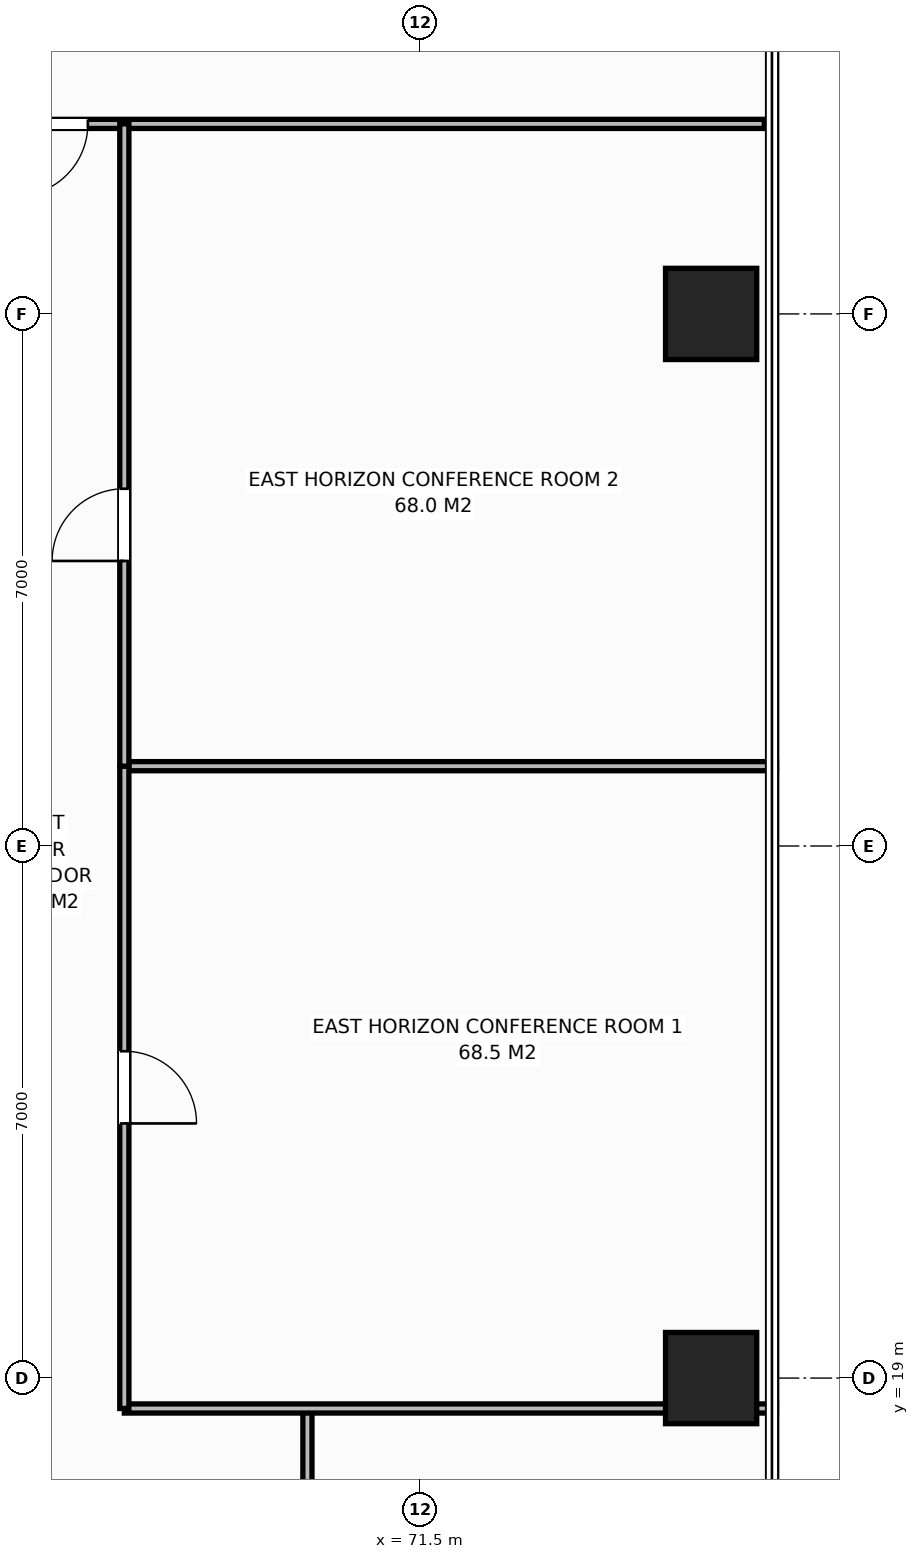
"""IFC4 building model, lengths in metres.
Left out: names, types, materials, properties, quantities, classifications, styles, units other than length and angle.
Written with IfcOpenShell. Run it as: python <this file> out.ifc"""

import sys

from ifc_helpers import new_model, si_unit, direction, frame, frame_2d, origin, origin_2d, place, context, subcontext, project, spatial, rectangle, extrude, element, fill, save


model = new_model("IFC4")
c1 = context("Model", 3, precision=1e-05, world=origin(), true_north=direction((0.0, 1.0)))
c2 = subcontext(c1, "Body", "Model", "MODEL_VIEW")
j1 = project(units=[si_unit("LENGTHUNIT", "METRE"), si_unit("PLANEANGLEUNIT", "RADIAN")], contexts=[c1])
p1 = place(None, origin())
s1 = spatial("IfcSite", under=j1, at=p1, CompositionType="ELEMENT")
p2 = place(p1, origin())
s2 = spatial("IfcBuilding", under=s1, at=p2, CompositionType="ELEMENT")
p3 = place(p2, frame((0.0, 0.0, 127.8)))
s3 = spatial("IfcBuildingStorey", under=s2, at=p3, CompositionType="ELEMENT", Elevation=127.8)
for number, where, z_axis, x_axis in (
    (1, (75.32, 19.0, 0.0), (0.0, 0.0, 1.0), (1.0, 0.0, 0.0)),
    (2, (75.32, 33.0, 0.0), (0.0, 0.0, 1.0), (1.0, 0.0, 0.0)),
):
    element("IfcColumn", number, at=place(p3, frame(where, z_axis=z_axis, x_axis=x_axis)), inside=s3, PredefinedType="COLUMN", context=c2, shape_type="SweptSolid", body=[
        extrude(rectangle(XDim=1.2, YDim=1.2, at=origin_2d()), origin(), (0.0, 0.0, 1.0), 3.8),
    ])
p4 = place(p3, frame((70.009, 16.5, 0.0), z_axis=(0.0, 0.0, 1.0), x_axis=(0.0, 1.0, 0.0)))
e3 = element("IfcWall", 3, at=p4, inside=s3, PredefinedType="PARTITIONING", context=c2, shape_type="SweptSolid", body=[
    extrude(rectangle(XDim=2.1, YDim=0.12, at=frame_2d((1.05, 0.0))), origin(), (0.0, 0.0, 1.0), 3.565),
])
p5 = place(p3, frame((64.86, 35.5, 0.0), z_axis=(0.0, 0.0, 1.0), x_axis=(1.0, 0.0, 0.0)))
e4 = element("IfcWall", 4, at=p5, inside=s3, PredefinedType="PARTITIONING", context=c2, shape_type="SweptSolid", body=[
    extrude(rectangle(XDim=11.16, YDim=0.12, at=frame_2d((5.58, 0.0))), origin(), (0.0, 0.0, 1.0), 3.565),
])
p6 = place(p5, frame((1.31, 0.0, 0.0)))
e5 = element("IfcOpeningElement", 5, at=p6, cuts=e4, PredefinedType="OPENING", context=c2, shape_type="SweptSolid", body=[
    extrude(rectangle(XDim=0.95, YDim=2.15, at=frame_2d((0.475, 1.075))), frame((0.0, 0.07, 0.0), z_axis=(0.0, -1.0, 0.0), x_axis=(1.0, 0.0, 0.0)), (0.0, 0.0, 1.0), 0.14),
])
for number, where, z_axis, x_axis in (
    (6, (67.6, 18.6, 0.0), (0.0, 0.0, 1.0), (1.0, 0.0, 0.0)),
    (7, (67.6, 27.05, 0.0), (0.0, 0.0, 1.0), (1.0, 0.0, 0.0)),
):
    element("IfcWall", number, at=place(p3, frame(where, z_axis=z_axis, x_axis=x_axis)), inside=s3, PredefinedType="PARTITIONING", context=c2, shape_type="SweptSolid", body=[
        extrude(rectangle(XDim=8.58, YDim=0.12, at=frame_2d((4.29, 0.0))), origin(), (0.0, 0.0, 1.0), 3.565),
    ])
p7 = place(p3, frame((67.6, 18.6, 0.0), z_axis=(0.0, 0.0, 1.0), x_axis=(0.0, 1.0, 0.0)))
e8 = element("IfcWall", 8, at=p7, inside=s3, PredefinedType="PARTITIONING", context=c2, shape_type="SweptSolid", body=[
    extrude(rectangle(XDim=8.45, YDim=0.12, at=frame_2d((4.225, 0.0))), origin(), (0.0, 0.0, 1.0), 3.565),
])
p8 = place(p7, frame((3.75, 0.0, 0.0)))
e9 = element("IfcOpeningElement", 9, at=p8, cuts=e8, PredefinedType="OPENING", context=c2, shape_type="SweptSolid", body=[
    extrude(rectangle(XDim=0.95, YDim=2.15, at=frame_2d((0.475, 1.075))), frame((0.0, 0.07, 0.0), z_axis=(0.0, -1.0, 0.0), x_axis=(1.0, 0.0, 0.0)), (0.0, 0.0, 1.0), 0.14),
])
p9 = place(p3, frame((67.6, 27.05, 0.0), z_axis=(0.0, 0.0, 1.0), x_axis=(0.0, 1.0, 0.0)))
e10 = element("IfcWall", 10, at=p9, inside=s3, PredefinedType="PARTITIONING", context=c2, shape_type="SweptSolid", body=[
    extrude(rectangle(XDim=8.45, YDim=0.12, at=frame_2d((4.225, 0.0))), origin(), (0.0, 0.0, 1.0), 3.565),
])
p10 = place(p9, frame((2.7, 0.0, 0.0)))
e11 = element("IfcOpeningElement", 11, at=p10, cuts=e10, PredefinedType="OPENING", context=c2, shape_type="SweptSolid", body=[
    extrude(rectangle(XDim=0.95, YDim=2.15, at=frame_2d((0.475, 1.075))), frame((0.0, 0.07, 0.0), z_axis=(0.0, -1.0, 0.0), x_axis=(1.0, 0.0, 0.0)), (0.0, 0.0, 1.0), 0.14),
])
p11 = place(p6, origin())
e12 = element("IfcDoor", 12, at=p11, inside=s3, OperationType="SINGLE_SWING_RIGHT", PredefinedType="DOOR", context=c2, shape_type="SweptSolid", body=[
    extrude(rectangle(XDim=0.95, YDim=2.15, at=frame_2d((0.475, 1.075))), frame((0.0, 0.025, 0.0), z_axis=(0.0, -1.0, 0.0), x_axis=(1.0, 0.0, 0.0)), (0.0, 0.0, 1.0), 0.05),
])
fill(e5, e12)
p12 = place(p8, origin())
e13 = element("IfcDoor", 13, at=p12, inside=s3, OperationType="SINGLE_SWING_RIGHT", PredefinedType="DOOR", context=c2, shape_type="SweptSolid", body=[
    extrude(rectangle(XDim=0.95, YDim=2.15, at=frame_2d((0.475, 1.075))), frame((0.0, 0.025, 0.0), z_axis=(0.0, -1.0, 0.0), x_axis=(1.0, 0.0, 0.0)), (0.0, 0.0, 1.0), 0.05),
])
fill(e9, e13)
p13 = place(p10, origin())
e14 = element("IfcDoor", 14, at=p13, inside=s3, OperationType="SINGLE_SWING_LEFT", PredefinedType="DOOR", context=c2, shape_type="SweptSolid", body=[
    extrude(rectangle(XDim=0.95, YDim=2.15, at=frame_2d((0.475, 1.075))), frame((0.0, 0.025, 0.0), z_axis=(0.0, -1.0, 0.0), x_axis=(1.0, 0.0, 0.0)), (0.0, 0.0, 1.0), 0.05),
])
fill(e11, e14)
save(model, sys.argv[1])
